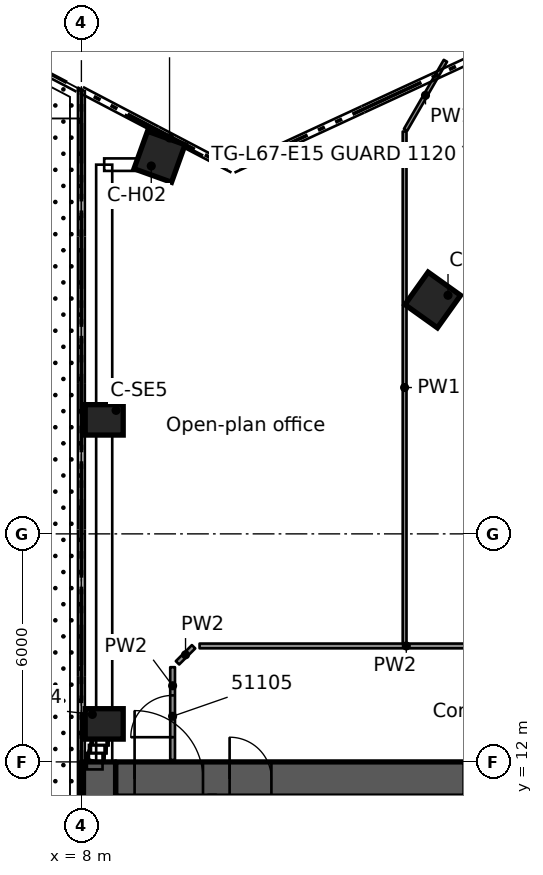
"""IFC4 building model, lengths in metres.
Left out: names, types, materials, properties, quantities, classifications, styles, units other than length and angle.
Written with IfcOpenShell. Run it as: python <this file> out.ifc"""

import sys

from ifc_helpers import new_model, si_unit, direction, frame, frame_2d, origin, origin_2d, place, context, subcontext, project, spatial, rectangle, extrude, element, fill, save


model = new_model("IFC4")
c1 = context("Model", 3, precision=1e-05, world=origin(), true_north=direction((0.0, 1.0)))
c2 = subcontext(c1, "Body", "Model", "MODEL_VIEW")
j1 = project(units=[si_unit("LENGTHUNIT", "METRE"), si_unit("PLANEANGLEUNIT", "RADIAN")], contexts=[c1])
p1 = place(None, origin())
s1 = spatial("IfcSite", under=j1, at=p1, CompositionType="ELEMENT")
p2 = place(p1, origin())
s2 = spatial("IfcBuilding", under=s1, at=p2, CompositionType="ELEMENT")
p3 = place(p2, frame((0.0, 0.0, 253.5)))
s3 = spatial("IfcBuildingStorey", under=s2, at=p3, CompositionType="ELEMENT", Elevation=253.5)
p4 = place(p3, frame((8.9, 11.55, 0.0), z_axis=(0.0, 0.0, 1.0), x_axis=(1.0, 0.0, 0.0)))
e1 = element("IfcWall", 1, at=p4, inside=s3, PredefinedType="SHEAR", context=c2, shape_type="SweptSolid", body=[
    extrude(rectangle(XDim=9.2, YDim=0.9, at=frame_2d((4.6, 0.0))), origin(), (0.0, 0.0, 1.0), 3.5),
])
p5 = place(p4, frame((0.5, 0.0, 0.0)))
e2 = element("IfcOpeningElement", 2, at=p5, cuts=e1, PredefinedType="OPENING", context=c2, shape_type="SweptSolid", body=[
    extrude(rectangle(XDim=1.8, YDim=2.1, at=frame_2d((0.9, 1.05))), frame((0.0, 0.46, 0.0), z_axis=(0.0, -1.0, 0.0), x_axis=(1.0, 0.0, 0.0)), (0.0, 0.0, 1.0), 0.92),
])
p6 = place(p4, frame((3.0, 0.0, 0.0)))
e3 = element("IfcOpeningElement", 3, at=p6, cuts=e1, PredefinedType="OPENING", context=c2, shape_type="SweptSolid", body=[
    extrude(rectangle(XDim=1.1, YDim=2.1, at=frame_2d((0.55, 1.05))), frame((0.0, 0.46, 0.0), z_axis=(0.0, -1.0, 0.0), x_axis=(1.0, 0.0, 0.0)), (0.0, 0.0, 1.0), 0.92),
])
p7 = place(p3, frame((8.45, -12.0, 0.0), z_axis=(0.0, 0.0, 1.0), x_axis=(0.0, 1.0, 0.0)))
e4 = element("IfcWall", 4, at=p7, inside=s3, PredefinedType="SHEAR", context=c2, shape_type="SweptSolid", body=[
    extrude(rectangle(XDim=24.0, YDim=0.9, at=frame_2d((12.0, 0.0))), origin(), (0.0, 0.0, 1.0), 3.5),
])
for number, where, z_axis, x_axis in (
    (5, (10.056, 27.923, 0.0), (0.0, 0.0, 1.0), (0.339, 0.941, 0.0)),
    (6, (17.246, 24.154, 0.0), (0.0, 0.0, 1.0), (0.581, 0.814, 0.0)),
):
    element("IfcColumn", number, at=place(p3, frame(where, z_axis=z_axis, x_axis=x_axis)), inside=s3, PredefinedType="COLUMN", context=c2, shape_type="SweptSolid", body=[
        extrude(rectangle(XDim=1.05, YDim=1.05, at=origin_2d()), origin(), (0.0, 0.0, 1.0), 3.5),
    ])
for number, where, z_axis, x_axis in (
    (7, (8.6, 13.0, 0.0), (0.0, 0.0, 1.0), (1.0, 0.0, 0.0)),
    (8, (8.6, 21.0, 0.0), (0.0, 0.0, 1.0), (1.0, 0.0, 0.0)),
):
    element("IfcColumn", number, at=place(p3, frame(where, z_axis=z_axis, x_axis=x_axis)), inside=s3, PredefinedType="COLUMN", context=c2, shape_type="SweptSolid", body=[
        extrude(rectangle(XDim=1.0, YDim=0.8, at=origin_2d()), origin(), (0.0, 0.0, 1.0), 3.5),
    ])
p8 = place(p2, frame((0.0, 0.0, 271.0)))
s4 = spatial("IfcBuildingStorey", under=s2, at=p8, CompositionType="ELEMENT", Elevation=271.0)
p9 = place(p8, frame((8.6, 31.179, -21.5), z_axis=(0.0, 0.0, 1.0), x_axis=(1.0, 0.0, 0.0)))
e9 = element("IfcColumn", 9, at=p9, inside=s4, PredefinedType="COLUMN", context=c2, shape_type="SweptSolid", body=[
    extrude(rectangle(XDim=1.2, YDim=1.2, at=origin_2d()), origin(), (0.0, 0.0, 1.0), 25.5),
])
p10 = place(p3, frame((11.11, 15.051, 0.0), z_axis=(0.0, 0.0, 1.0), x_axis=(1.0, 0.0, 0.0)))
e10 = element("IfcWall", 10, at=p10, inside=s3, PredefinedType="PARTITIONING", context=c2, shape_type="SweptSolid", body=[
    extrude(rectangle(XDim=10.878, YDim=0.125, at=frame_2d((5.439, 0.0))), origin(), (0.0, 0.0, 1.0), 3.08),
])
p11 = place(p10, frame((7.745, 0.0, 0.0)))
e11 = element("IfcOpeningElement", 11, at=p11, cuts=e10, PredefinedType="OPENING", context=c2, shape_type="SweptSolid", body=[
    extrude(rectangle(XDim=0.9, YDim=2.1, at=frame_2d((0.45, 1.05))), frame((0.0, 0.073, 0.0), z_axis=(0.0, -1.0, 0.0), x_axis=(1.0, 0.0, 0.0)), (0.0, 0.0, 1.0), 0.145),
])
p12 = place(p3, frame((10.529, 14.607, 0.0), z_axis=(0.0, 0.0, 1.0), x_axis=(0.706902680526, 0.707310822952, 0.0)))
e12 = element("IfcWall", 12, at=p12, inside=s3, PredefinedType="PARTITIONING", context=c2, shape_type="SweptSolid", body=[
    extrude(rectangle(XDim=0.598, YDim=0.125, at=frame_2d((0.299, 0.0))), origin(), (0.0, 0.0, 1.0), 3.08),
])
p13 = place(p3, frame((16.53, 28.63, 0.0), z_axis=(0.0, 0.0, 1.0), x_axis=(0.499779509621, 0.866152666545, 0.0)))
e13 = element("IfcWall", 13, at=p13, inside=s3, PredefinedType="PARTITIONING", context=c2, shape_type="SweptSolid", body=[
    extrude(rectangle(XDim=2.099, YDim=0.1, at=frame_2d((1.05, 0.0))), origin(), (0.0, 0.0, 1.0), 3.08),
])
p14 = place(p3, frame((16.505, 15.114, 0.0), z_axis=(0.0, 0.0, 1.0), x_axis=(0.0, 1.0, 0.0)))
e14 = element("IfcWall", 14, at=p14, inside=s3, PredefinedType="PARTITIONING", context=c2, shape_type="SweptSolid", body=[
    extrude(rectangle(XDim=13.473, YDim=0.1, at=frame_2d((6.736, 0.0))), origin(), (0.0, 0.0, 1.0), 3.08),
])
p15 = place(p3, frame((10.4, 12.05, 0.0), z_axis=(0.0, 0.0, 1.0), x_axis=(0.0, 1.0, 0.0)))
e15 = element("IfcWall", 15, at=p15, inside=s3, PredefinedType="PARTITIONING", context=c2, shape_type="SweptSolid", body=[
    extrude(rectangle(XDim=2.442, YDim=0.125, at=frame_2d((1.221, 0.0))), origin(), (0.0, 0.0, 1.0), 3.08),
])
p16 = place(p15, frame((0.6, 0.0, 0.0)))
e16 = element("IfcOpeningElement", 16, at=p16, cuts=e15, PredefinedType="OPENING", context=c2, shape_type="SweptSolid", body=[
    extrude(rectangle(XDim=1.1, YDim=2.1, at=frame_2d((0.55, 1.05))), frame((0.0, 0.073, 0.0), z_axis=(0.0, -1.0, 0.0), x_axis=(1.0, 0.0, 0.0)), (0.0, 0.0, 1.0), 0.145),
])
p17 = place(p5, origin())
e17 = element("IfcDoor", 17, at=p17, inside=s3, OperationType="SINGLE_SWING_LEFT", PredefinedType="DOOR", context=c2, shape_type="SweptSolid", body=[
    extrude(rectangle(XDim=1.8, YDim=2.1, at=frame_2d((0.9, 1.05))), frame((0.0, 0.025, 0.0), z_axis=(0.0, -1.0, 0.0), x_axis=(1.0, 0.0, 0.0)), (0.0, 0.0, 1.0), 0.05),
])
fill(e2, e17)
p18 = place(p6, origin())
e18 = element("IfcDoor", 18, at=p18, inside=s3, OperationType="SINGLE_SWING_LEFT", PredefinedType="DOOR", context=c2, shape_type="SweptSolid", body=[
    extrude(rectangle(XDim=1.1, YDim=2.1, at=frame_2d((0.55, 1.05))), frame((0.0, 0.025, 0.0), z_axis=(0.0, -1.0, 0.0), x_axis=(1.0, 0.0, 0.0)), (0.0, 0.0, 1.0), 0.05),
])
fill(e3, e18)
p19 = place(p16, origin())
e19 = element("IfcDoor", 19, at=p19, inside=s3, OperationType="SINGLE_SWING_LEFT", PredefinedType="DOOR", context=c2, shape_type="SweptSolid", body=[
    extrude(rectangle(XDim=1.1, YDim=2.1, at=frame_2d((0.55, 1.05))), frame((0.0, 0.025, 0.0), z_axis=(0.0, -1.0, 0.0), x_axis=(1.0, 0.0, 0.0)), (0.0, 0.0, 1.0), 0.05),
])
fill(e16, e19)
save(model, sys.argv[1])
